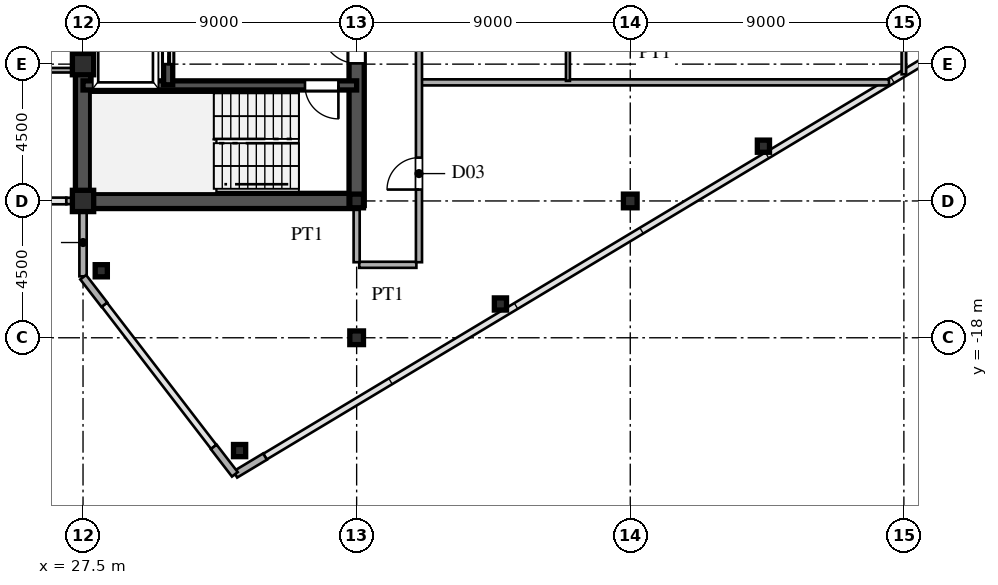
"""IFC4 building model, lengths in metres.
Left out: names, types, materials, properties, quantities, classifications, styles, units other than length and angle.
Written with IfcOpenShell. Run it as: python <this file> out.ifc"""

import sys

from ifc_helpers import new_model, si_unit, direction, frame, frame_2d, origin, origin_2d, place, context, subcontext, project, spatial, rectangle, hollow_rectangle, i_section, extrude, source, transform, mapped, element, fill, save


model = new_model("IFC4")
c1 = context("Model", 3, precision=1e-05, world=origin(), true_north=direction((0.0, 1.0)))
c2 = subcontext(c1, "Body", "Model", "MODEL_VIEW")
j1 = project(units=[si_unit("LENGTHUNIT", "METRE"), si_unit("PLANEANGLEUNIT", "RADIAN")], contexts=[c1])
p1 = place(None, origin())
s1 = spatial("IfcSite", under=j1, at=p1, CompositionType="ELEMENT")
p2 = place(p1, origin())
s2 = spatial("IfcBuilding", under=s1, at=p2, CompositionType="ELEMENT")
p3 = place(p2, frame((0.0, 0.0, 258.15)))
s3 = spatial("IfcBuildingStorey", under=s2, at=p3, CompositionType="ELEMENT", Elevation=258.15)
m1 = source(origin(), c2, "Body", "SweptSolid", [
    extrude(hollow_rectangle(XDim=0.7, YDim=0.7, WallThickness=0.03, at=origin_2d()), origin(), (0.0, 0.0, 1.0), 3.75),
])
for number, where, z_axis, x_axis in (
    (1, (27.5, -13.5, 0.0), (0.0, 0.0, 1.0), (1.0, 0.0, 0.0)),
    (2, (27.5, -9.0, 0.0), (0.0, 0.0, 1.0), (1.0, 0.0, 0.0)),
):
    element("IfcColumn", number, at=place(p3, frame(where, z_axis=z_axis, x_axis=x_axis)), inside=s3, PredefinedType="COLUMN", context=c2, shape_type="MappedRepresentation", body=[
        mapped(m1, transform((0.0, 0.0, 0.0), scale=1.0)),
    ])
m2 = source(origin(), c2, "Body", "SweptSolid", [
    extrude(i_section(OverallWidth=0.45, OverallDepth=0.45, WebThickness=0.016, FlangeThickness=0.025, at=origin_2d()), origin(), (0.0, 0.0, 1.0), 3.75),
])
for number, where, z_axis, x_axis in (
    (3, (36.5, -18.0, 0.0), (0.0, 0.0, 1.0), (1.0, 0.0, 0.0)),
    (4, (36.5, -13.5, 0.0), (0.0, 0.0, 1.0), (1.0, 0.0, 0.0)),
    (5, (45.5, -13.5, 0.0), (0.0, 0.0, 1.0), (1.0, 0.0, 0.0)),
):
    element("IfcColumn", number, at=place(p3, frame(where, z_axis=z_axis, x_axis=x_axis)), inside=s3, PredefinedType="COLUMN", context=c2, shape_type="MappedRepresentation", body=[
        mapped(m2, transform((0.0, 0.0, 0.0), scale=1.0)),
    ])
m3 = source(origin(), c2, "Body", "SweptSolid", [
    extrude(hollow_rectangle(XDim=0.4, YDim=0.4, WallThickness=0.016, at=origin_2d()), origin(), (0.0, 0.0, 1.0), 3.75),
])
for number, where, z_axis, x_axis in (
    (6, (32.65, -21.71, 0.0), (0.0, 0.0, 1.0), (1.0, 0.0, 0.0)),
    (7, (28.1, -15.796, 0.0), (0.0, 0.0, 1.0), (1.0, 0.0, 0.0)),
    (8, (41.23, -16.889, 0.0), (0.0, 0.0, 1.0), (1.0, 0.0, 0.0)),
    (9, (49.88, -11.699, 0.0), (0.0, 0.0, 1.0), (1.0, 0.0, 0.0)),
):
    element("IfcColumn", number, at=place(p3, frame(where, z_axis=z_axis, x_axis=x_axis)), inside=s3, PredefinedType="COLUMN", context=c2, shape_type="MappedRepresentation", body=[
        mapped(m3, transform((0.0, 0.0, 0.0), scale=1.0)),
    ])
p4 = place(p3, frame((32.509, -22.495, 0.0), z_axis=(0.0, 0.0, 1.0), x_axis=(0.85743623509, 0.514590228002, 0.0)))
e10 = element("IfcWall", 10, at=p4, inside=s3, PredefinedType="SOLIDWALL", context=c2, shape_type="SweptSolid", body=[
    extrude(rectangle(XDim=1.14, YDim=0.24, at=frame_2d((0.57, 0.0))), origin(), (0.0, 0.0, 1.0), 3.53),
])
p5 = place(p3, frame((27.5, -15.98, 0.0), z_axis=(0.0, 0.0, 1.0), x_axis=(0.0, 1.0, 0.0)))
e11 = element("IfcWall", 11, at=p5, inside=s3, PredefinedType="SOLIDWALL", context=c2, shape_type="SweptSolid", body=[
    extrude(rectangle(XDim=1.605, YDim=0.24, at=frame_2d((0.803, 0.0))), origin(), (0.0, 0.0, 1.0), 3.53),
])
p6 = place(p3, frame((27.5, -14.375, 0.0), z_axis=(0.0, 0.0, 1.0), x_axis=(0.0, 1.0, 0.0)))
e12 = element("IfcWall", 12, at=p6, inside=s3, PredefinedType="SOLIDWALL", context=c2, shape_type="SweptSolid", body=[
    extrude(rectangle(XDim=0.62, YDim=0.24, at=frame_2d((0.31, 0.0))), origin(), (0.0, 0.0, 1.0), 3.03),
])
for number, where, z_axis, x_axis in (
    (13, (27.506, -16.008, 0.0), (0.0, 0.0, 1.0), (0.61, -0.793, 0.0)),
    (14, (31.799, -21.588, 0.0), (0.0, 0.0, 1.0), (0.61, -0.793, 0.0)),
):
    element("IfcWall", number, at=place(p3, frame(where, z_axis=z_axis, x_axis=x_axis)), inside=s3, PredefinedType="SOLIDWALL", context=c2, shape_type="SweptSolid", body=[
        extrude(rectangle(XDim=1.14, YDim=0.24, at=frame_2d((0.57, 0.0))), origin(), (0.0, 0.0, 1.0), 3.53),
    ])
p7 = place(p3, frame((26.95, -13.5, 0.0), z_axis=(0.0, 0.0, 1.0), x_axis=(1.0, 0.0, 0.0)))
e15 = element("IfcWall", 15, at=p7, inside=s3, PredefinedType="SOLIDWALL", context=c2, shape_type="SweptSolid", body=[
    extrude(rectangle(XDim=0.54, YDim=0.21, at=frame_2d((0.27, 0.0))), origin(), (0.0, 0.0, 1.0), 3.03),
])
p8 = place(p3, frame((27.5, -13.5, 0.0), z_axis=(0.0, 0.0, 1.0), x_axis=(0.0, 1.0, 0.0)))
e16 = element("IfcWall", 16, at=p8, inside=s3, PredefinedType="SHEAR", context=c2, shape_type="SweptSolid", body=[
    extrude(rectangle(XDim=12.2, YDim=0.5, at=frame_2d((6.1, 0.0))), origin(), (0.0, 0.0, 1.0), 3.53),
])
p9 = place(p3, frame((27.5, -13.5, 0.0), z_axis=(0.0, 0.0, 1.0), x_axis=(1.0, 0.0, 0.0)))
e17 = element("IfcWall", 17, at=p9, inside=s3, PredefinedType="SHEAR", context=c2, shape_type="SweptSolid", body=[
    extrude(rectangle(XDim=9.0, YDim=0.5, at=frame_2d((4.5, 0.0))), origin(), (0.0, 0.0, 1.0), 3.53),
])
p10 = place(p3, frame((36.5, -13.65, 0.0), z_axis=(0.0, 0.0, 1.0), x_axis=(0.0, 1.0, 0.0)))
e18 = element("IfcWall", 18, at=p10, inside=s3, PredefinedType="SHEAR", context=c2, shape_type="SweptSolid", body=[
    extrude(rectangle(XDim=7.15, YDim=0.5, at=frame_2d((3.575, 0.0))), origin(), (0.0, 0.0, 1.0), 3.53),
])
p11 = place(p10, frame((4.675, 0.0, 0.0)))
e19 = element("IfcOpeningElement", 19, at=p11, cuts=e18, PredefinedType="OPENING", context=c2, shape_type="SweptSolid", body=[
    extrude(rectangle(XDim=1.15, YDim=2.2, at=frame_2d((0.575, 1.1))), frame((0.0, 0.26, 0.0), z_axis=(0.0, -1.0, 0.0), x_axis=(1.0, 0.0, 0.0)), (0.0, 0.0, 1.0), 0.52),
])
p12 = place(p3, frame((27.5, -9.7, 0.0), z_axis=(0.0, 0.0, 1.0), x_axis=(1.0, 0.0, 0.0)))
e20 = element("IfcWall", 20, at=p12, inside=s3, PredefinedType="SHEAR", context=c2, shape_type="SweptSolid", body=[
    extrude(rectangle(XDim=9.0, YDim=0.3, at=frame_2d((4.5, 0.0))), origin(), (0.0, 0.0, 1.0), 3.53),
])
p13 = place(p12, frame((7.3, 0.0, 0.0)))
e21 = element("IfcOpeningElement", 21, at=p13, cuts=e20, PredefinedType="OPENING", context=c2, shape_type="SweptSolid", body=[
    extrude(rectangle(XDim=1.1, YDim=2.2, at=frame_2d((0.55, 1.1))), frame((0.0, 0.16, 0.0), z_axis=(0.0, -1.0, 0.0), x_axis=(1.0, 0.0, 0.0)), (0.0, 0.0, 1.0), 0.32),
])
p14 = place(p3, frame((30.3, -9.68, 0.0), z_axis=(0.0, 0.0, 1.0), x_axis=(0.0, 1.0, 0.0)))
e22 = element("IfcWall", 22, at=p14, inside=s3, PredefinedType="SHEAR", context=c2, shape_type="SweptSolid", body=[
    extrude(rectangle(XDim=2.56, YDim=0.3, at=frame_2d((1.28, 0.0))), origin(), (0.0, 0.0, 1.0), 3.53),
])
p15 = place(p14, frame((0.68, 0.0, 0.0)))
e23 = element("IfcOpeningElement", 23, at=p15, cuts=e22, PredefinedType="OPENING", context=c2, shape_type="SweptSolid", body=[
    extrude(rectangle(XDim=1.2, YDim=2.25, at=frame_2d((0.6, 1.125))), frame((0.0, 0.16, 0.0), z_axis=(0.0, -1.0, 0.0), x_axis=(1.0, 0.0, 0.0)), (0.0, 0.0, 1.0), 0.32),
])
p16 = place(p3, frame((36.585, -15.6, 0.0), z_axis=(0.0, 0.0, 1.0), x_axis=(1.0, 0.0, 0.0)))
e24 = element("IfcWall", 24, at=p16, inside=s3, PredefinedType="PARTITIONING", context=c2, shape_type="SweptSolid", body=[
    extrude(rectangle(XDim=1.88, YDim=0.2, at=frame_2d((0.94, 0.0))), origin(), (0.0, 0.0, 1.0), 3.53),
])
p17 = place(p3, frame((38.63, -9.6, 0.0), z_axis=(0.0, 0.0, 1.0), x_axis=(1.0, 0.0, 0.0)))
e25 = element("IfcWall", 25, at=p17, inside=s3, PredefinedType="PARTITIONING", context=c2, shape_type="SweptSolid", body=[
    extrude(rectangle(XDim=15.38, YDim=0.2, at=frame_2d((7.69, 0.0))), origin(), (0.0, 0.0, 1.0), 3.53),
])
p18 = place(p3, frame((4.585, -9.2, 0.0), z_axis=(0.0, 0.0, 1.0), x_axis=(1.0, 0.0, 0.0)))
e26 = element("IfcWall", 26, at=p18, inside=s3, PredefinedType="PARTITIONING", context=c2, shape_type="SweptSolid", body=[
    extrude(rectangle(XDim=22.66, YDim=0.15, at=frame_2d((11.33, 0.0))), origin(), (0.0, 0.0, 1.0), 3.53),
])
p19 = place(p18, frame((3.94, 0.0, 0.0)))
e27 = element("IfcOpeningElement", 27, at=p19, cuts=e26, PredefinedType="OPENING", context=c2, shape_type="SweptSolid", body=[
    extrude(rectangle(XDim=0.95, YDim=2.15, at=frame_2d((0.475, 1.075))), frame((0.0, 0.085, 0.0), z_axis=(0.0, -1.0, 0.0), x_axis=(1.0, 0.0, 0.0)), (0.0, 0.0, 1.0), 0.17),
])
p20 = place(p18, frame((11.94, 0.0, 0.0)))
e28 = element("IfcOpeningElement", 28, at=p20, cuts=e26, PredefinedType="OPENING", context=c2, shape_type="SweptSolid", body=[
    extrude(rectangle(XDim=0.95, YDim=2.15, at=frame_2d((0.475, 1.075))), frame((0.0, 0.085, 0.0), z_axis=(0.0, -1.0, 0.0), x_axis=(1.0, 0.0, 0.0)), (0.0, 0.0, 1.0), 0.17),
])
p21 = place(p18, frame((18.94, 0.0, 0.0)))
e29 = element("IfcOpeningElement", 29, at=p21, cuts=e26, PredefinedType="OPENING", context=c2, shape_type="SweptSolid", body=[
    extrude(rectangle(XDim=0.95, YDim=2.15, at=frame_2d((0.475, 1.075))), frame((0.0, 0.085, 0.0), z_axis=(0.0, -1.0, 0.0), x_axis=(1.0, 0.0, 0.0)), (0.0, 0.0, 1.0), 0.17),
])
p22 = place(p3, frame((36.5, -15.515, 0.0), z_axis=(0.0, 0.0, 1.0), x_axis=(0.0, 1.0, 0.0)))
e30 = element("IfcWall", 30, at=p22, inside=s3, PredefinedType="PARTITIONING", context=c2, shape_type="SweptSolid", body=[
    extrude(rectangle(XDim=1.76, YDim=0.2, at=frame_2d((0.88, 0.0))), origin(), (0.0, 0.0, 1.0), 2.93),
])
p23 = place(p3, frame((38.55, -15.515, 0.0), z_axis=(0.0, 0.0, 1.0), x_axis=(0.0, 1.0, 0.0)))
e31 = element("IfcWall", 31, at=p23, inside=s3, PredefinedType="PARTITIONING", context=c2, shape_type="SweptSolid", body=[
    extrude(rectangle(XDim=31.03, YDim=0.2, at=frame_2d((15.515, 0.0))), origin(), (0.0, 0.0, 1.0), 3.53),
])
p24 = place(p23, frame((2.39, 0.0, 0.0)))
e32 = element("IfcOpeningElement", 32, at=p24, cuts=e31, PredefinedType="OPENING", context=c2, shape_type="SweptSolid", body=[
    extrude(rectangle(XDim=1.05, YDim=2.25, at=frame_2d((0.525, 1.125))), frame((0.0, 0.11, 0.0), z_axis=(0.0, -1.0, 0.0), x_axis=(1.0, 0.0, 0.0)), (0.0, 0.0, 1.0), 0.22),
])
p25 = place(p23, frame((11.889, 0.0, 0.0)))
e33 = element("IfcOpeningElement", 33, at=p25, cuts=e31, PredefinedType="OPENING", context=c2, shape_type="SweptSolid", body=[
    extrude(rectangle(XDim=1.05, YDim=2.25, at=frame_2d((0.525, 1.125))), frame((0.0, 0.11, 0.0), z_axis=(0.0, -1.0, 0.0), x_axis=(1.0, 0.0, 0.0)), (0.0, 0.0, 1.0), 0.22),
])
p26 = place(p23, frame((24.69, 0.0, 0.0)))
e34 = element("IfcOpeningElement", 34, at=p26, cuts=e31, PredefinedType="OPENING", context=c2, shape_type="SweptSolid", body=[
    extrude(rectangle(XDim=1.05, YDim=2.25, at=frame_2d((0.525, 1.125))), frame((0.0, 0.11, 0.0), z_axis=(0.0, -1.0, 0.0), x_axis=(1.0, 0.0, 0.0)), (0.0, 0.0, 1.0), 0.22),
])
p27 = place(p3, frame((43.45, -9.55, 0.0), z_axis=(0.0, 0.0, 1.0), x_axis=(0.0, 1.0, 0.0)))
e35 = element("IfcWall", 35, at=p27, inside=s3, PredefinedType="PARTITIONING", context=c2, shape_type="SweptSolid", body=[
    extrude(rectangle(XDim=8.833, YDim=0.13, at=frame_2d((4.417, 0.0))), origin(), (0.0, 0.0, 1.0), 3.53),
])
p28 = place(p27, frame((6.175, 0.0, 0.0)))
e36 = element("IfcOpeningElement", 36, at=p28, cuts=e35, PredefinedType="OPENING", context=c2, shape_type="SweptSolid", body=[
    extrude(rectangle(XDim=0.95, YDim=2.15, at=frame_2d((0.475, 1.075))), frame((0.0, 0.075, 0.0), z_axis=(0.0, -1.0, 0.0), x_axis=(1.0, 0.0, 0.0)), (0.0, 0.0, 1.0), 0.15),
])
p29 = place(p3, frame((54.5, -9.335, 0.0), z_axis=(0.0, 0.0, 1.0), x_axis=(0.0, 1.0, 0.0)))
e37 = element("IfcWall", 37, at=p29, inside=s3, PredefinedType="PARTITIONING", context=c2, shape_type="SweptSolid", body=[
    extrude(rectangle(XDim=13.085, YDim=0.15, at=frame_2d((6.542, 0.0))), origin(), (0.0, 0.0, 1.0), 2.93),
])
p30 = place(p29, frame((5.96, 0.0, 0.0)))
e38 = element("IfcOpeningElement", 38, at=p30, cuts=e37, PredefinedType="OPENING", context=c2, shape_type="SweptSolid", body=[
    extrude(rectangle(XDim=0.95, YDim=2.15, at=frame_2d((0.475, 1.075))), frame((0.0, 0.085, 0.0), z_axis=(0.0, -1.0, 0.0), x_axis=(1.0, 0.0, 0.0)), (0.0, 0.0, 1.0), 0.17),
])
p31 = place(p29, frame((1.643, 0.0, 0.0)))
e39 = element("IfcOpeningElement", 39, at=p31, cuts=e37, PredefinedType="OPENING", context=c2, shape_type="SweptSolid", body=[
    extrude(rectangle(XDim=0.95, YDim=2.15, at=frame_2d((0.475, 1.075))), frame((0.0, 0.085, 0.0), z_axis=(0.0, -1.0, 0.0), x_axis=(1.0, 0.0, 0.0)), (0.0, 0.0, 1.0), 0.17),
])
p32 = place(p29, frame((10.427, 0.0, 0.0)))
e40 = element("IfcOpeningElement", 40, at=p32, cuts=e37, PredefinedType="OPENING", context=c2, shape_type="SweptSolid", body=[
    extrude(rectangle(XDim=0.95, YDim=2.15, at=frame_2d((0.475, 1.075))), frame((0.0, 0.085, 0.0), z_axis=(0.0, -1.0, 0.0), x_axis=(1.0, 0.0, 0.0)), (0.0, 0.0, 1.0), 0.17),
])
m4 = source(origin(), c2, "Body", "SweptSolid", [
    extrude(rectangle(XDim=1.15, YDim=2.2, at=frame_2d((0.575, 1.1))), frame((0.0, 0.025, 0.0), z_axis=(0.0, -1.0, 0.0), x_axis=(1.0, 0.0, 0.0)), (0.0, 0.0, 1.0), 0.05),
])
p33 = place(p11, origin())
e41 = element("IfcDoor", 41, at=p33, inside=s3, OperationType="SINGLE_SWING_RIGHT", PredefinedType="DOOR", context=c2, shape_type="MappedRepresentation", body=[
    mapped(m4, transform((0.0, 0.0, 0.0), scale=1.0)),
])
fill(e19, e41)
m5 = source(origin(), c2, "Body", "SweptSolid", [
    extrude(rectangle(XDim=1.1, YDim=2.2, at=frame_2d((0.55, 1.1))), frame((0.0, 0.025, 0.0), z_axis=(0.0, -1.0, 0.0), x_axis=(1.0, 0.0, 0.0)), (0.0, 0.0, 1.0), 0.05),
])
p34 = place(p13, frame((1.1, 0.0, 0.0), z_axis=(0.0, 0.0, 1.0), x_axis=(-1.0, 0.0, 0.0)))
e42 = element("IfcDoor", 42, at=p34, inside=s3, OperationType="SINGLE_SWING_RIGHT", PredefinedType="DOOR", context=c2, shape_type="MappedRepresentation", body=[
    mapped(m5, transform((0.0, 0.0, 0.0), scale=1.0)),
])
fill(e21, e42)
m6 = source(origin(), c2, "Body", "SweptSolid", [
    extrude(rectangle(XDim=1.2, YDim=2.25, at=frame_2d((0.6, 1.125))), frame((0.0, 0.025, 0.0), z_axis=(0.0, -1.0, 0.0), x_axis=(1.0, 0.0, 0.0)), (0.0, 0.0, 1.0), 0.05),
])
p35 = place(p15, origin())
e43 = element("IfcDoor", 43, at=p35, inside=s3, OperationType="DOUBLE_DOOR_SLIDING", PredefinedType="DOOR", context=c2, shape_type="MappedRepresentation", body=[
    mapped(m6, transform((0.0, 0.0, 0.0), scale=1.0)),
])
fill(e23, e43)
m7 = source(origin(), c2, "Body", "SweptSolid", [
    extrude(rectangle(XDim=1.05, YDim=2.25, at=frame_2d((0.525, 1.125))), frame((0.0, 0.025, 0.0), z_axis=(0.0, -1.0, 0.0), x_axis=(1.0, 0.0, 0.0)), (0.0, 0.0, 1.0), 0.05),
])
p36 = place(p24, origin())
e44 = element("IfcDoor", 44, at=p36, inside=s3, OperationType="SINGLE_SWING_LEFT", PredefinedType="DOOR", context=c2, shape_type="MappedRepresentation", body=[
    mapped(m7, transform((0.0, 0.0, 0.0), scale=1.0)),
])
fill(e32, e44)
save(model, sys.argv[1])
